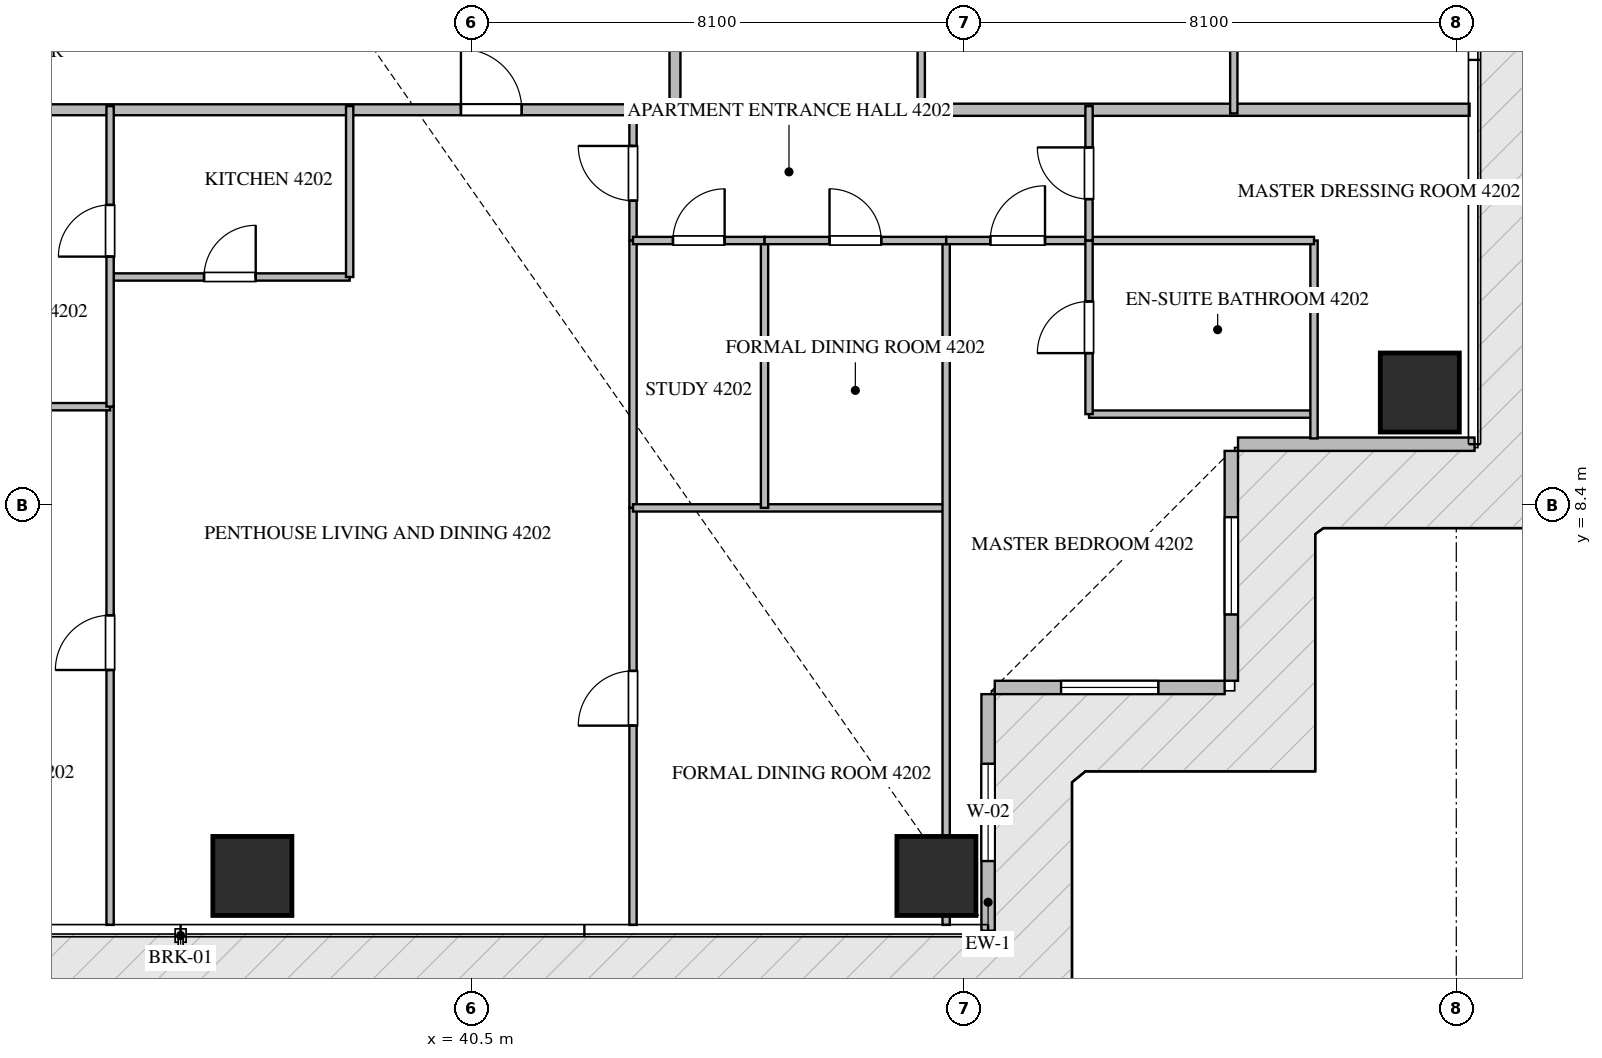
"""IFC4 building model, lengths in metres.
Left out: names, types, materials, properties, quantities, classifications, styles, units other than length and angle.
Written with IfcOpenShell. Run it as: python <this file> out.ifc"""

import sys

from ifc_helpers import new_model, si_unit, direction, frame, frame_2d, origin, origin_2d, place, context, subcontext, project, spatial, rectangle, extrude, source, transform, mapped, element, fill, save


model = new_model("IFC4")
c1 = context("Model", 3, precision=1e-05, world=origin(), true_north=direction((0.0, 1.0)))
c2 = subcontext(c1, "Body", "Model", "MODEL_VIEW")
j1 = project(units=[si_unit("LENGTHUNIT", "METRE"), si_unit("PLANEANGLEUNIT", "RADIAN")], contexts=[c1])
p1 = place(None, origin())
s1 = spatial("IfcSite", under=j1, at=p1, CompositionType="ELEMENT")
p2 = place(p1, origin())
s2 = spatial("IfcBuilding", under=s1, at=p2, CompositionType="ELEMENT")
p3 = place(p2, frame((0.0, 0.0, 168.9)))
s3 = spatial("IfcBuildingStorey", under=s2, at=p3, CompositionType="ELEMENT", Elevation=168.9)
m1 = source(origin(), c2, "Body", "SweptSolid", [
    extrude(rectangle(XDim=1.3, YDim=1.3, at=origin_2d()), origin(), (0.0, 0.0, 1.0), 3.75),
])
for number, where, z_axis, x_axis in (
    (1, (36.9, 2.3, -0.26), (0.0, 0.0, 1.0), (1.0, 0.0, 0.0)),
    (2, (48.15, 2.3, -0.26), (0.0, 0.0, 1.0), (1.0, 0.0, 0.0)),
    (3, (56.1, 10.25, -0.26), (0.0, 0.0, 1.0), (1.0, 0.0, 0.0)),
):
    element("IfcColumn", number, at=place(p3, frame(where, z_axis=z_axis, x_axis=x_axis)), inside=s3, PredefinedType="COLUMN", context=c2, shape_type="MappedRepresentation", body=[
        mapped(m1, transform((0.0, 0.0, 0.0), scale=1.0)),
    ])
p4 = place(p3, frame((49.0, 1.4, 0.0), z_axis=(0.0, 0.0, 1.0), x_axis=(0.0, 1.0, 0.0)))
e4 = element("IfcWall", 4, at=p4, inside=s3, PredefinedType="ELEMENTEDWALL", context=c2, shape_type="SweptSolid", body=[
    extrude(rectangle(XDim=3.89, YDim=0.22, at=frame_2d((1.945, 0.0))), origin(), (0.0, 0.0, 1.0), 3.475),
])
p5 = place(p4, frame((1.145, 0.0, 0.65)))
e5 = element("IfcOpeningElement", 5, at=p5, cuts=e4, PredefinedType="OPENING", context=c2, shape_type="SweptSolid", body=[
    extrude(rectangle(XDim=1.6, YDim=2.1, at=frame_2d((0.8, 1.05))), frame((0.0, 0.12, 0.0), z_axis=(0.0, -1.0, 0.0), x_axis=(1.0, 0.0, 0.0)), (0.0, 0.0, 1.0), 0.24),
])
p6 = place(p3, frame((49.11, 5.4, 0.0), z_axis=(0.0, 0.0, 1.0), x_axis=(1.0, 0.0, 0.0)))
e6 = element("IfcWall", 6, at=p6, inside=s3, PredefinedType="ELEMENTEDWALL", context=c2, shape_type="SweptSolid", body=[
    extrude(rectangle(XDim=3.78, YDim=0.22, at=frame_2d((1.89, 0.0))), origin(), (0.0, 0.0, 1.0), 3.475),
])
p7 = place(p6, frame((1.09, 0.0, 0.65)))
e7 = element("IfcOpeningElement", 7, at=p7, cuts=e6, PredefinedType="OPENING", context=c2, shape_type="SweptSolid", body=[
    extrude(rectangle(XDim=1.6, YDim=2.1, at=frame_2d((0.8, 1.05))), frame((0.0, 0.12, 0.0), z_axis=(0.0, -1.0, 0.0), x_axis=(1.0, 0.0, 0.0)), (0.0, 0.0, 1.0), 0.24),
])
p8 = place(p3, frame((53.0, 5.51, 0.0), z_axis=(0.0, 0.0, 1.0), x_axis=(0.0, 1.0, 0.0)))
e8 = element("IfcWall", 8, at=p8, inside=s3, PredefinedType="ELEMENTEDWALL", context=c2, shape_type="SweptSolid", body=[
    extrude(rectangle(XDim=3.78, YDim=0.22, at=frame_2d((1.89, 0.0))), origin(), (0.0, 0.0, 1.0), 3.475),
])
p9 = place(p8, frame((1.09, 0.0, 0.65)))
e9 = element("IfcOpeningElement", 9, at=p9, cuts=e8, PredefinedType="OPENING", context=c2, shape_type="SweptSolid", body=[
    extrude(rectangle(XDim=1.6, YDim=2.1, at=frame_2d((0.8, 1.05))), frame((0.0, 0.12, 0.0), z_axis=(0.0, -1.0, 0.0), x_axis=(1.0, 0.0, 0.0)), (0.0, 0.0, 1.0), 0.24),
])
p10 = place(p3, frame((53.11, 9.4, 0.0), z_axis=(0.0, 0.0, 1.0), x_axis=(1.0, 0.0, 0.0)))
e10 = element("IfcWall", 10, at=p10, inside=s3, PredefinedType="ELEMENTEDWALL", context=c2, shape_type="SweptSolid", body=[
    extrude(rectangle(XDim=3.89, YDim=0.22, at=frame_2d((1.945, 0.0))), origin(), (0.0, 0.0, 1.0), 3.475),
])
p11 = place(p3, frame((43.85, 14.9, 0.0), z_axis=(0.0, 0.0, 1.0), x_axis=(1.0, 0.0, 0.0)))
e11 = element("IfcWall", 11, at=p11, inside=s3, PredefinedType="PARTITIONING", context=c2, shape_type="SweptSolid", body=[
    extrude(rectangle(XDim=13.068, YDim=0.2, at=frame_2d((6.534, 0.0))), origin(), (0.0, 0.0, 1.0), 3.49),
])
p12 = place(p3, frame((20.952, 14.9, 0.0), z_axis=(0.0, 0.0, 1.0), x_axis=(1.0, 0.0, 0.0)))
e12 = element("IfcWall", 12, at=p12, inside=s3, PredefinedType="PARTITIONING", context=c2, shape_type="SweptSolid", body=[
    extrude(rectangle(XDim=22.896, YDim=0.18, at=frame_2d((11.448, 0.0))), origin(), (0.0, 0.0, 1.0), 3.49),
])
p13 = place(p12, frame((5.452, 0.0, 0.0)))
e13 = element("IfcOpeningElement", 13, at=p13, cuts=e12, PredefinedType="OPENING", context=c2, shape_type="SweptSolid", body=[
    extrude(rectangle(XDim=1.0, YDim=2.15, at=frame_2d((0.5, 1.075))), frame((0.0, 0.1, 0.0), z_axis=(0.0, -1.0, 0.0), x_axis=(1.0, 0.0, 0.0)), (0.0, 0.0, 1.0), 0.2),
])
p14 = place(p12, frame((19.378, 0.0, 0.0)))
e14 = element("IfcOpeningElement", 14, at=p14, cuts=e12, PredefinedType="OPENING", context=c2, shape_type="SweptSolid", body=[
    extrude(rectangle(XDim=1.0, YDim=2.15, at=frame_2d((0.5, 1.075))), frame((0.0, 0.1, 0.0), z_axis=(0.0, -1.0, 0.0), x_axis=(1.0, 0.0, 0.0)), (0.0, 0.0, 1.0), 0.2),
])
p15 = place(p3, frame((43.85, 14.9, 0.0), z_axis=(0.0, 0.0, 1.0), x_axis=(0.0, 1.0, 0.0)))
e15 = element("IfcWall", 15, at=p15, inside=s3, PredefinedType="PARTITIONING", context=c2, shape_type="SweptSolid", body=[
    extrude(rectangle(XDim=18.7, YDim=0.18, at=frame_2d((9.35, 0.0))), origin(), (0.0, 0.0, 1.0), 3.49),
])
p16 = place(p15, frame((14.603, 0.0, 0.0)))
e16 = element("IfcOpeningElement", 16, at=p16, cuts=e15, PredefinedType="OPENING", context=c2, shape_type="SweptSolid", body=[
    extrude(rectangle(XDim=1.0, YDim=2.15, at=frame_2d((0.5, 1.075))), frame((0.0, 0.1, 0.0), z_axis=(0.0, -1.0, 0.0), x_axis=(1.0, 0.0, 0.0)), (0.0, 0.0, 1.0), 0.2),
])
p17 = place(p3, frame((34.56, 12.15, 0.0), z_axis=(0.0, 0.0, 1.0), x_axis=(1.0, 0.0, 0.0)))
e17 = element("IfcWall", 17, at=p17, inside=s3, PredefinedType="PARTITIONING", context=c2, shape_type="SweptSolid", body=[
    extrude(rectangle(XDim=3.94, YDim=0.12, at=frame_2d((1.97, 0.0))), origin(), (0.0, 0.0, 1.0), 3.49),
])
p18 = place(p17, frame((1.545, 0.0, 0.0)))
e18 = element("IfcOpeningElement", 18, at=p18, cuts=e17, PredefinedType="OPENING", context=c2, shape_type="SweptSolid", body=[
    extrude(rectangle(XDim=0.85, YDim=2.1, at=frame_2d((0.425, 1.05))), frame((0.0, 0.07, 0.0), z_axis=(0.0, -1.0, 0.0), x_axis=(1.0, 0.0, 0.0)), (0.0, 0.0, 1.0), 0.14),
])
p19 = place(p3, frame((38.5, 12.15, 0.0), z_axis=(0.0, 0.0, 1.0), x_axis=(0.0, 1.0, 0.0)))
e19 = element("IfcWall", 19, at=p19, inside=s3, PredefinedType="PARTITIONING", context=c2, shape_type="SweptSolid", body=[
    extrude(rectangle(XDim=2.81, YDim=0.12, at=frame_2d((1.405, 0.0))), origin(), (0.0, 0.0, 1.0), 3.49),
])
p20 = place(p3, frame((34.56, 1.495, 0.0), z_axis=(0.0, 0.0, 1.0), x_axis=(0.0, 1.0, 0.0)))
e20 = element("IfcWall", 20, at=p20, inside=s3, PredefinedType="PARTITIONING", context=c2, shape_type="SweptSolid", body=[
    extrude(rectangle(XDim=8.522, YDim=0.12, at=frame_2d((4.261, 0.0))), origin(), (0.0, 0.0, 1.0), 3.49),
])
p21 = place(p20, frame((4.192, 0.0, 0.0)))
e21 = element("IfcOpeningElement", 21, at=p21, cuts=e20, PredefinedType="OPENING", context=c2, shape_type="SweptSolid", body=[
    extrude(rectangle(XDim=0.9, YDim=2.1, at=frame_2d((0.45, 1.05))), frame((0.0, 0.07, 0.0), z_axis=(0.0, -1.0, 0.0), x_axis=(1.0, 0.0, 0.0)), (0.0, 0.0, 1.0), 0.14),
])
p22 = place(p3, frame((31.462, 10.017, 0.0), z_axis=(0.0, 0.0, 1.0), x_axis=(1.0, 0.0, 0.0)))
e22 = element("IfcWall", 22, at=p22, inside=s3, PredefinedType="PARTITIONING", context=c2, shape_type="SweptSolid", body=[
    extrude(rectangle(XDim=3.098, YDim=0.12, at=frame_2d((1.549, 0.0))), origin(), (0.0, 0.0, 1.0), 3.49),
])
p23 = place(p3, frame((34.56, 10.019, 0.0), z_axis=(0.0, 0.0, 1.0), x_axis=(0.0, 1.0, 0.0)))
e23 = element("IfcWall", 23, at=p23, inside=s3, PredefinedType="PARTITIONING", context=c2, shape_type="SweptSolid", body=[
    extrude(rectangle(XDim=4.941, YDim=0.12, at=frame_2d((2.47, 0.0))), origin(), (0.0, 0.0, 1.0), 3.49),
])
p24 = place(p23, frame((2.466, 0.0, 0.0)))
e24 = element("IfcOpeningElement", 24, at=p24, cuts=e23, PredefinedType="OPENING", context=c2, shape_type="SweptSolid", body=[
    extrude(rectangle(XDim=0.85, YDim=2.1, at=frame_2d((0.425, 1.05))), frame((0.0, 0.07, 0.0), z_axis=(0.0, -1.0, 0.0), x_axis=(1.0, 0.0, 0.0)), (0.0, 0.0, 1.0), 0.14),
])
p25 = place(p3, frame((43.16, 12.75, 0.0), z_axis=(0.0, 0.0, 1.0), x_axis=(0.0, 1.0, 0.0)))
e25 = element("IfcWall", 25, at=p25, inside=s3, PredefinedType="PARTITIONING", context=c2, shape_type="SweptSolid", body=[
    extrude(rectangle(XDim=2.21, YDim=0.12, at=frame_2d((1.105, 0.0))), origin(), (0.0, 0.0, 1.0), 3.49),
])
p26 = place(p25, frame((0.655, 0.0, 0.0)))
e26 = element("IfcOpeningElement", 26, at=p26, cuts=e25, PredefinedType="OPENING", context=c2, shape_type="SweptSolid", body=[
    extrude(rectangle(XDim=0.9, YDim=2.1, at=frame_2d((0.45, 1.05))), frame((0.0, 0.07, 0.0), z_axis=(0.0, -1.0, 0.0), x_axis=(1.0, 0.0, 0.0)), (0.0, 0.0, 1.0), 0.14),
])
p27 = place(p3, frame((43.16, 1.495, 0.0), z_axis=(0.0, 0.0, 1.0), x_axis=(0.0, 1.0, 0.0)))
e27 = element("IfcWall", 27, at=p27, inside=s3, PredefinedType="PARTITIONING", context=c2, shape_type="SweptSolid", body=[
    extrude(rectangle(XDim=6.858, YDim=0.12, at=frame_2d((3.429, 0.0))), origin(), (0.0, 0.0, 1.0), 3.49),
])
p28 = place(p27, frame((3.277, 0.0, 0.0)))
e28 = element("IfcOpeningElement", 28, at=p28, cuts=e27, PredefinedType="OPENING", context=c2, shape_type="SweptSolid", body=[
    extrude(rectangle(XDim=0.9, YDim=2.1, at=frame_2d((0.45, 1.05))), frame((0.0, 0.07, 0.0), z_axis=(0.0, -1.0, 0.0), x_axis=(1.0, 0.0, 0.0)), (0.0, 0.0, 1.0), 0.14),
])
p29 = place(p3, frame((43.16, 8.355, 0.0), z_axis=(0.0, 0.0, 1.0), x_axis=(0.0, 1.0, 0.0)))
e29 = element("IfcWall", 29, at=p29, inside=s3, PredefinedType="PARTITIONING", context=c2, shape_type="SweptSolid", body=[
    extrude(rectangle(XDim=4.393, YDim=0.12, at=frame_2d((2.197, 0.0))), origin(), (0.0, 0.0, 1.0), 3.49),
])
p30 = place(p3, frame((43.16, 8.353, 0.0), z_axis=(0.0, 0.0, 1.0), x_axis=(1.0, 0.0, 0.0)))
e30 = element("IfcWall", 30, at=p30, inside=s3, PredefinedType="PARTITIONING", context=c2, shape_type="SweptSolid", body=[
    extrude(rectangle(XDim=5.15, YDim=0.12, at=frame_2d((2.575, 0.0))), origin(), (0.0, 0.0, 1.0), 3.49),
])
p31 = place(p3, frame((48.31, 1.495, 0.0), z_axis=(0.0, 0.0, 1.0), x_axis=(0.0, 1.0, 0.0)))
e31 = element("IfcWall", 31, at=p31, inside=s3, PredefinedType="PARTITIONING", context=c2, shape_type="SweptSolid", body=[
    extrude(rectangle(XDim=11.255, YDim=0.12, at=frame_2d((5.627, 0.0))), origin(), (0.0, 0.0, 1.0), 2.972),
])
p32 = place(p3, frame((45.323, 8.353, 0.0), z_axis=(0.0, 0.0, 1.0), x_axis=(0.0, 1.0, 0.0)))
e32 = element("IfcWall", 32, at=p32, inside=s3, PredefinedType="PARTITIONING", context=c2, shape_type="SweptSolid", body=[
    extrude(rectangle(XDim=4.397, YDim=0.12, at=frame_2d((2.198, 0.0))), origin(), (0.0, 0.0, 1.0), 3.49),
])
p33 = place(p3, frame((43.16, 12.75, 0.0), z_axis=(0.0, 0.0, 1.0), x_axis=(1.0, 0.0, 0.0)))
e33 = element("IfcWall", 33, at=p33, inside=s3, PredefinedType="PARTITIONING", context=c2, shape_type="SweptSolid", body=[
    extrude(rectangle(XDim=2.163, YDim=0.12, at=frame_2d((1.082, 0.0))), origin(), (0.0, 0.0, 1.0), 3.49),
])
p34 = place(p33, frame((0.657, 0.0, 0.0)))
e34 = element("IfcOpeningElement", 34, at=p34, cuts=e33, PredefinedType="OPENING", context=c2, shape_type="SweptSolid", body=[
    extrude(rectangle(XDim=0.85, YDim=2.1, at=frame_2d((0.425, 1.05))), frame((0.0, 0.07, 0.0), z_axis=(0.0, -1.0, 0.0), x_axis=(1.0, 0.0, 0.0)), (0.0, 0.0, 1.0), 0.14),
])
p35 = place(p3, frame((45.325, 12.75, 0.0), z_axis=(0.0, 0.0, 1.0), x_axis=(1.0, 0.0, 0.0)))
e35 = element("IfcWall", 35, at=p35, inside=s3, PredefinedType="PARTITIONING", context=c2, shape_type="SweptSolid", body=[
    extrude(rectangle(XDim=2.985, YDim=0.12, at=frame_2d((1.493, 0.0))), origin(), (0.0, 0.0, 1.0), 3.49),
])
p36 = place(p35, frame((1.067, 0.0, 0.0)))
e36 = element("IfcOpeningElement", 36, at=p36, cuts=e35, PredefinedType="OPENING", context=c2, shape_type="SweptSolid", body=[
    extrude(rectangle(XDim=0.85, YDim=2.1, at=frame_2d((0.425, 1.05))), frame((0.0, 0.07, 0.0), z_axis=(0.0, -1.0, 0.0), x_axis=(1.0, 0.0, 0.0)), (0.0, 0.0, 1.0), 0.14),
])
p37 = place(p3, frame((48.312, 12.75, 0.0), z_axis=(0.0, 0.0, 1.0), x_axis=(1.0, 0.0, 0.0)))
e37 = element("IfcWall", 37, at=p37, inside=s3, PredefinedType="PARTITIONING", context=c2, shape_type="SweptSolid", body=[
    extrude(rectangle(XDim=2.348, YDim=0.12, at=frame_2d((1.174, 0.0))), origin(), (0.0, 0.0, 1.0), 3.49),
])
p38 = place(p37, frame((0.724, 0.0, 0.0)))
e38 = element("IfcOpeningElement", 38, at=p38, cuts=e37, PredefinedType="OPENING", context=c2, shape_type="SweptSolid", body=[
    extrude(rectangle(XDim=0.9, YDim=2.1, at=frame_2d((0.45, 1.05))), frame((0.0, 0.07, 0.0), z_axis=(0.0, -1.0, 0.0), x_axis=(1.0, 0.0, 0.0)), (0.0, 0.0, 1.0), 0.14),
])
p39 = place(p3, frame((50.66, 9.895, 0.0), z_axis=(0.0, 0.0, 1.0), x_axis=(1.0, 0.0, 0.0)))
e39 = element("IfcWall", 39, at=p39, inside=s3, PredefinedType="PARTITIONING", context=c2, shape_type="SweptSolid", body=[
    extrude(rectangle(XDim=3.7, YDim=0.12, at=frame_2d((1.85, 0.0))), origin(), (0.0, 0.0, 1.0), 3.49),
])
p40 = place(p3, frame((54.36, 9.495, 0.0), z_axis=(0.0, 0.0, 1.0), x_axis=(0.0, 1.0, 0.0)))
e40 = element("IfcWall", 40, at=p40, inside=s3, PredefinedType="PARTITIONING", context=c2, shape_type="SweptSolid", body=[
    extrude(rectangle(XDim=3.255, YDim=0.12, at=frame_2d((1.627, 0.0))), origin(), (0.0, 0.0, 1.0), 3.49),
])
p41 = place(p3, frame((50.662, 12.75, 0.0), z_axis=(0.0, 0.0, 1.0), x_axis=(1.0, 0.0, 0.0)))
e41 = element("IfcWall", 41, at=p41, inside=s3, PredefinedType="PARTITIONING", context=c2, shape_type="SweptSolid", body=[
    extrude(rectangle(XDim=3.698, YDim=0.12, at=frame_2d((1.849, 0.0))), origin(), (0.0, 0.0, 1.0), 3.49),
])
p42 = place(p3, frame((50.66, 9.895, 0.0), z_axis=(0.0, 0.0, 1.0), x_axis=(0.0, 1.0, 0.0)))
e42 = element("IfcWall", 42, at=p42, inside=s3, PredefinedType="PARTITIONING", context=c2, shape_type="SweptSolid", body=[
    extrude(rectangle(XDim=2.855, YDim=0.12, at=frame_2d((1.427, 0.0))), origin(), (0.0, 0.0, 1.0), 3.49),
])
p43 = place(p42, frame((1.003, 0.0, 0.0)))
e43 = element("IfcOpeningElement", 43, at=p43, cuts=e42, PredefinedType="OPENING", context=c2, shape_type="SweptSolid", body=[
    extrude(rectangle(XDim=0.85, YDim=2.1, at=frame_2d((0.425, 1.05))), frame((0.0, 0.07, 0.0), z_axis=(0.0, -1.0, 0.0), x_axis=(1.0, 0.0, 0.0)), (0.0, 0.0, 1.0), 0.14),
])
p44 = place(p3, frame((50.66, 12.752, 0.0), z_axis=(0.0, 0.0, 1.0), x_axis=(0.0, 1.0, 0.0)))
e44 = element("IfcWall", 44, at=p44, inside=s3, PredefinedType="PARTITIONING", context=c2, shape_type="SweptSolid", body=[
    extrude(rectangle(XDim=2.208, YDim=0.12, at=frame_2d((1.104, 0.0))), origin(), (0.0, 0.0, 1.0), 3.49),
])
p45 = place(p44, frame((0.679, 0.0, 0.0)))
e45 = element("IfcOpeningElement", 45, at=p45, cuts=e44, PredefinedType="OPENING", context=c2, shape_type="SweptSolid", body=[
    extrude(rectangle(XDim=0.85, YDim=2.1, at=frame_2d((0.425, 1.05))), frame((0.0, 0.07, 0.0), z_axis=(0.0, -1.0, 0.0), x_axis=(1.0, 0.0, 0.0)), (0.0, 0.0, 1.0), 0.14),
])
p46 = place(p3, frame((53.041, 14.84, 0.0), z_axis=(0.0, 0.0, 1.0), x_axis=(0.0, 1.0, 0.0)))
e46 = element("IfcWall", 46, at=p46, inside=s3, PredefinedType="PARTITIONING", context=c2, shape_type="SweptSolid", body=[
    extrude(rectangle(XDim=11.65, YDim=0.12, at=frame_2d((5.825, 0.0))), origin(), (0.0, 0.0, 1.0), 3.49),
])
p47 = place(p3, frame((47.9, 14.84, 0.0), z_axis=(0.0, 0.0, 1.0), x_axis=(0.0, 1.0, 0.0)))
e47 = element("IfcWall", 47, at=p47, inside=s3, PredefinedType="PARTITIONING", context=c2, shape_type="SweptSolid", body=[
    extrude(rectangle(XDim=11.65, YDim=0.12, at=frame_2d((5.825, 0.0))), origin(), (0.0, 0.0, 1.0), 2.972),
])
m2 = source(origin(), c2, "Body", "SweptSolid", [
    extrude(rectangle(XDim=1.6, YDim=2.1, at=frame_2d((0.8, 1.05))), frame((0.0, 0.03, 0.0), z_axis=(0.0, -1.0, 0.0), x_axis=(1.0, 0.0, 0.0)), (0.0, 0.0, 1.0), 0.06),
])
p48 = place(p5, origin())
e48 = element("IfcWindow", 48, at=p48, inside=s3, PartitioningType="SINGLE_PANEL", PredefinedType="WINDOW", context=c2, shape_type="MappedRepresentation", body=[
    mapped(m2, transform((0.0, 0.0, 0.0), scale=1.0)),
])
fill(e5, e48)
p49 = place(p7, origin())
e49 = element("IfcWindow", 49, at=p49, inside=s3, PartitioningType="SINGLE_PANEL", PredefinedType="WINDOW", context=c2, shape_type="MappedRepresentation", body=[
    mapped(m2, transform((0.0, 0.0, 0.0), scale=1.0)),
])
fill(e7, e49)
p50 = place(p9, origin())
e50 = element("IfcWindow", 50, at=p50, inside=s3, PartitioningType="SINGLE_PANEL", PredefinedType="WINDOW", context=c2, shape_type="MappedRepresentation", body=[
    mapped(m2, transform((0.0, 0.0, 0.0), scale=1.0)),
])
fill(e9, e50)
m3 = source(origin(), c2, "Body", "SweptSolid", [
    extrude(rectangle(XDim=1.0, YDim=2.15, at=frame_2d((0.5, 1.075))), frame((0.0, 0.025, 0.0), z_axis=(0.0, -1.0, 0.0), x_axis=(1.0, 0.0, 0.0)), (0.0, 0.0, 1.0), 0.05),
])
p51 = place(p14, origin())
e51 = element("IfcDoor", 51, at=p51, inside=s3, OperationType="SINGLE_SWING_LEFT", PredefinedType="DOOR", context=c2, shape_type="MappedRepresentation", body=[
    mapped(m3, transform((0.0, 0.0, 0.0), scale=1.0)),
])
fill(e14, e51)
m4 = source(origin(), c2, "Body", "SweptSolid", [
    extrude(rectangle(XDim=0.85, YDim=2.1, at=frame_2d((0.425, 1.05))), frame((0.0, 0.025, 0.0), z_axis=(0.0, -1.0, 0.0), x_axis=(1.0, 0.0, 0.0)), (0.0, 0.0, 1.0), 0.05),
])
p52 = place(p18, origin())
e52 = element("IfcDoor", 52, at=p52, inside=s3, OperationType="SINGLE_SWING_RIGHT", PredefinedType="DOOR", context=c2, shape_type="MappedRepresentation", body=[
    mapped(m4, transform((0.0, 0.0, 0.0), scale=1.0)),
])
fill(e18, e52)
m5 = source(origin(), c2, "Body", "SweptSolid", [
    extrude(rectangle(XDim=0.9, YDim=2.1, at=frame_2d((0.45, 1.05))), frame((0.0, 0.025, 0.0), z_axis=(0.0, -1.0, 0.0), x_axis=(1.0, 0.0, 0.0)), (0.0, 0.0, 1.0), 0.05),
])
p53 = place(p21, origin())
e53 = element("IfcDoor", 53, at=p53, inside=s3, OperationType="SINGLE_SWING_LEFT", PredefinedType="DOOR", context=c2, shape_type="MappedRepresentation", body=[
    mapped(m5, transform((0.0, 0.0, 0.0), scale=1.0)),
])
fill(e21, e53)
p54 = place(p24, origin())
e54 = element("IfcDoor", 54, at=p54, inside=s3, OperationType="SINGLE_SWING_LEFT", PredefinedType="DOOR", context=c2, shape_type="MappedRepresentation", body=[
    mapped(m4, transform((0.0, 0.0, 0.0), scale=1.0)),
])
fill(e24, e54)
p55 = place(p26, origin())
e55 = element("IfcDoor", 55, at=p55, inside=s3, OperationType="SINGLE_SWING_RIGHT", PredefinedType="DOOR", context=c2, shape_type="MappedRepresentation", body=[
    mapped(m5, transform((0.0, 0.0, 0.0), scale=1.0)),
])
fill(e26, e55)
p56 = place(p28, origin())
e56 = element("IfcDoor", 56, at=p56, inside=s3, OperationType="SINGLE_SWING_LEFT", PredefinedType="DOOR", context=c2, shape_type="MappedRepresentation", body=[
    mapped(m5, transform((0.0, 0.0, 0.0), scale=1.0)),
])
fill(e28, e56)
p57 = place(p34, origin())
e57 = element("IfcDoor", 57, at=p57, inside=s3, OperationType="SINGLE_SWING_RIGHT", PredefinedType="DOOR", context=c2, shape_type="MappedRepresentation", body=[
    mapped(m4, transform((0.0, 0.0, 0.0), scale=1.0)),
])
fill(e34, e57)
p58 = place(p36, origin())
e58 = element("IfcDoor", 58, at=p58, inside=s3, OperationType="SINGLE_SWING_LEFT", PredefinedType="DOOR", context=c2, shape_type="MappedRepresentation", body=[
    mapped(m4, transform((0.0, 0.0, 0.0), scale=1.0)),
])
fill(e36, e58)
p59 = place(p38, origin())
e59 = element("IfcDoor", 59, at=p59, inside=s3, OperationType="SINGLE_SWING_RIGHT", PredefinedType="DOOR", context=c2, shape_type="MappedRepresentation", body=[
    mapped(m5, transform((0.0, 0.0, 0.0), scale=1.0)),
])
fill(e38, e59)
p60 = place(p43, origin())
e60 = element("IfcDoor", 60, at=p60, inside=s3, OperationType="SINGLE_SWING_LEFT", PredefinedType="DOOR", context=c2, shape_type="MappedRepresentation", body=[
    mapped(m4, transform((0.0, 0.0, 0.0), scale=1.0)),
])
fill(e43, e60)
p61 = place(p45, origin())
e61 = element("IfcDoor", 61, at=p61, inside=s3, OperationType="SINGLE_SWING_RIGHT", PredefinedType="DOOR", context=c2, shape_type="MappedRepresentation", body=[
    mapped(m4, transform((0.0, 0.0, 0.0), scale=1.0)),
])
fill(e45, e61)
save(model, sys.argv[1])
